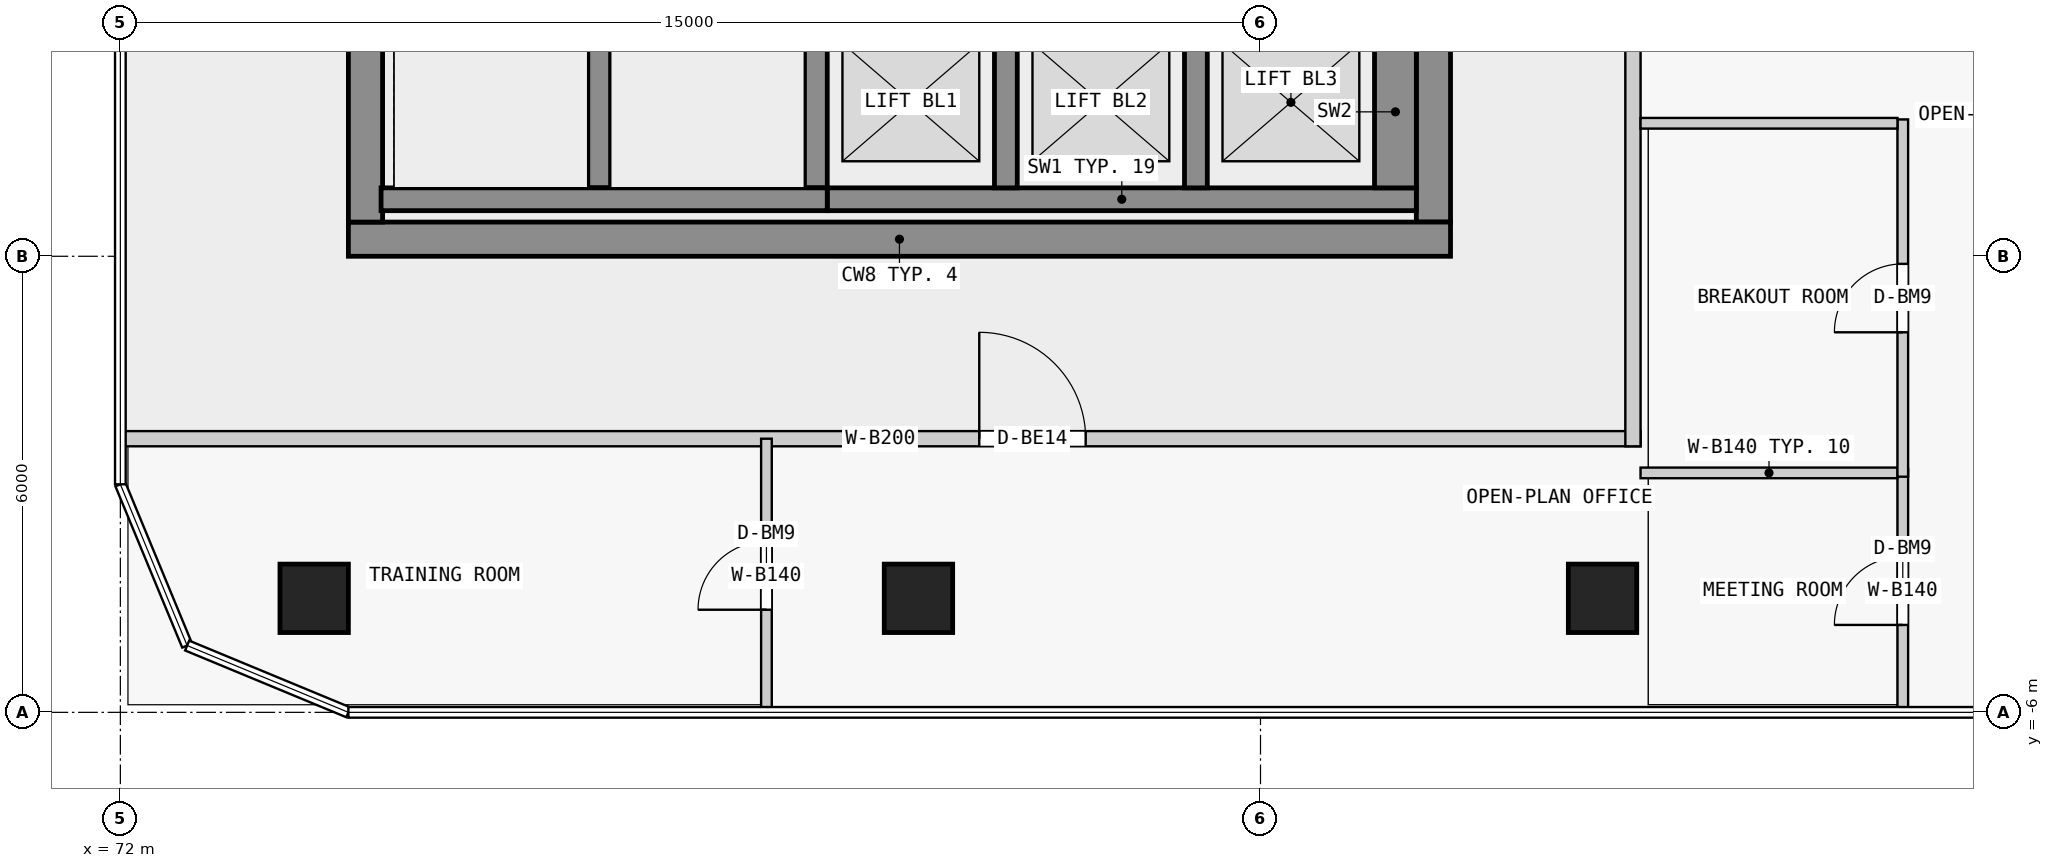
"""IFC4 building model, lengths in metres.
Left out: names, types, materials, properties, quantities, classifications, styles, units other than length and angle.
Written with IfcOpenShell. Run it as: python <this file> out.ifc"""

import sys

from ifc_helpers import new_model, si_unit, direction, frame, frame_2d, origin, origin_2d, place, context, subcontext, project, spatial, rectangle, extrude, element, fill, save


model = new_model("IFC4")
c1 = context("Model", 3, precision=1e-05, world=origin(), true_north=direction((0.0, 1.0)))
c2 = subcontext(c1, "Body", "Model", "MODEL_VIEW")
j1 = project(units=[si_unit("LENGTHUNIT", "METRE"), si_unit("PLANEANGLEUNIT", "RADIAN")], contexts=[c1])
p1 = place(None, origin())
s1 = spatial("IfcSite", under=j1, at=p1, CompositionType="ELEMENT")
p2 = place(p1, origin())
s2 = spatial("IfcBuilding", under=s1, at=p2, CompositionType="ELEMENT")
p3 = place(p2, frame((0.0, 0.0, 65.3)))
s3 = spatial("IfcBuildingStorey", under=s2, at=p3, CompositionType="ELEMENT", Elevation=65.3)
for number, where, z_axis, x_axis in (
    (1, (74.55, -4.5, 0.0), (0.0, 0.0, 1.0), (1.0, 0.0, 0.0)),
    (2, (82.5, -4.5, 0.0), (0.0, 0.0, 1.0), (1.0, 0.0, 0.0)),
    (3, (91.5, -4.5, 0.0), (0.0, 0.0, 1.0), (1.0, 0.0, 0.0)),
):
    element("IfcColumn", number, at=place(p3, frame(where, z_axis=z_axis, x_axis=x_axis)), inside=s3, PredefinedType="COLUMN", context=c2, shape_type="SweptSolid", body=[
        extrude(rectangle(XDim=0.9, YDim=0.9, at=origin_2d()), origin(), (0.0, 0.0, 1.0), 3.5),
    ])
p4 = place(p3, frame((75.0, 0.225, 0.0), z_axis=(0.0, 0.0, 1.0), x_axis=(1.0, 0.0, 0.0)))
e4 = element("IfcWall", 4, at=p4, inside=s3, PredefinedType="SHEAR", context=c2, shape_type="SweptSolid", body=[
    extrude(rectangle(XDim=14.5, YDim=0.45, at=frame_2d((7.25, 0.0))), origin(), (0.0, 0.0, 1.0), 3.25),
])
p5 = place(p3, frame((75.225, 0.45, 0.0), z_axis=(0.0, 0.0, 1.0), x_axis=(0.0, 1.0, 0.0)))
e5 = element("IfcWall", 5, at=p5, inside=s3, PredefinedType="SHEAR", context=c2, shape_type="SweptSolid", body=[
    extrude(rectangle(XDim=17.1, YDim=0.45, at=frame_2d((8.55, 0.0))), origin(), (0.0, 0.0, 1.0), 3.25),
])
p6 = place(p5, frame((7.875, 0.0, 0.0)))
e6 = element("IfcOpeningElement", 6, at=p6, cuts=e5, PredefinedType="OPENING", context=c2, shape_type="SweptSolid", body=[
    extrude(rectangle(XDim=1.8, YDim=2.1, at=frame_2d((0.9, 1.05))), frame((0.0, 0.235, 0.0), z_axis=(0.0, -1.0, 0.0), x_axis=(1.0, 0.0, 0.0)), (0.0, 0.0, 1.0), 0.47),
])
p7 = place(p3, frame((89.275, 0.45, 0.0), z_axis=(0.0, 0.0, 1.0), x_axis=(0.0, 1.0, 0.0)))
e7 = element("IfcWall", 7, at=p7, inside=s3, PredefinedType="SHEAR", context=c2, shape_type="SweptSolid", body=[
    extrude(rectangle(XDim=17.1, YDim=0.45, at=frame_2d((8.55, 0.0))), origin(), (0.0, 0.0, 1.0), 3.25),
])
p8 = place(p7, frame((7.65, 0.0, 0.0)))
e8 = element("IfcOpeningElement", 8, at=p8, cuts=e7, PredefinedType="OPENING", context=c2, shape_type="SweptSolid", body=[
    extrude(rectangle(XDim=1.8, YDim=2.1, at=frame_2d((0.9, 1.05))), frame((0.0, 0.235, 0.0), z_axis=(0.0, -1.0, 0.0), x_axis=(1.0, 0.0, 0.0)), (0.0, 0.0, 1.0), 0.47),
])
p9 = place(p3, frame((75.43, 0.75, 0.0), z_axis=(0.0, 0.0, 1.0), x_axis=(1.0, 0.0, 0.0)))
e9 = element("IfcWall", 9, at=p9, inside=s3, PredefinedType="SHEAR", context=c2, shape_type="SweptSolid", body=[
    extrude(rectangle(XDim=5.87, YDim=0.3, at=frame_2d((2.935, 0.0))), origin(), (0.0, 0.0, 1.0), 3.25),
])
for number, where, z_axis, x_axis in (
    (10, (78.3, 0.9, 0.0), (0.0, 0.0, 1.0), (0.0, 1.0, 0.0)),
    (11, (81.15, 0.9, 0.0), (0.0, 0.0, 1.0), (0.0, 1.0, 0.0)),
):
    element("IfcWall", number, at=place(p3, frame(where, z_axis=z_axis, x_axis=x_axis)), inside=s3, PredefinedType="SHEAR", context=c2, shape_type="SweptSolid", body=[
        extrude(rectangle(XDim=6.4, YDim=0.3, at=frame_2d((3.2, 0.0))), origin(), (0.0, 0.0, 1.0), 3.25),
    ])
p10 = place(p3, frame((81.3, 0.75, 0.0), z_axis=(0.0, 0.0, 1.0), x_axis=(1.0, 0.0, 0.0)))
e12 = element("IfcWall", 12, at=p10, inside=s3, PredefinedType="SHEAR", context=c2, shape_type="SweptSolid", body=[
    extrude(rectangle(XDim=7.75, YDim=0.3, at=frame_2d((3.875, 0.0))), origin(), (0.0, 0.0, 1.0), 3.25),
])
for number, where, z_axis, x_axis in (
    (13, (83.65, 0.9, 0.0), (0.0, 0.0, 1.0), (0.0, 1.0, 0.0)),
    (14, (86.15, 0.9, 0.0), (0.0, 0.0, 1.0), (0.0, 1.0, 0.0)),
):
    element("IfcWall", number, at=place(p3, frame(where, z_axis=z_axis, x_axis=x_axis)), inside=s3, PredefinedType="SHEAR", context=c2, shape_type="SweptSolid", body=[
        extrude(rectangle(XDim=2.0, YDim=0.3, at=frame_2d((1.0, 0.0))), origin(), (0.0, 0.0, 1.0), 3.25),
    ])
p11 = place(p3, frame((88.775, 0.9, 0.0), z_axis=(0.0, 0.0, 1.0), x_axis=(0.0, 1.0, 0.0)))
e15 = element("IfcWall", 15, at=p11, inside=s3, PredefinedType="SHEAR", context=c2, shape_type="SweptSolid", body=[
    extrude(rectangle(XDim=2.0, YDim=0.55, at=frame_2d((1.0, 0.0))), origin(), (0.0, 0.0, 1.0), 3.25),
])
p12 = place(p3, frame((72.0, -2.4, 0.0), z_axis=(0.0, 0.0, 1.0), x_axis=(1.0, 0.0, 0.0)))
e16 = element("IfcWall", 16, at=p12, inside=s3, PredefinedType="PARTITIONING", context=c2, shape_type="SweptSolid", body=[
    extrude(rectangle(XDim=20.0, YDim=0.2, at=frame_2d((10.0, 0.0))), origin(), (0.0, 0.0, 1.0), 3.25),
])
p13 = place(p12, frame((11.3, 0.0, 0.0)))
e17 = element("IfcOpeningElement", 17, at=p13, cuts=e16, PredefinedType="OPENING", context=c2, shape_type="SweptSolid", body=[
    extrude(rectangle(XDim=1.4, YDim=2.4, at=frame_2d((0.7, 1.2))), frame((0.0, 0.11, 0.0), z_axis=(0.0, -1.0, 0.0), x_axis=(1.0, 0.0, 0.0)), (0.0, 0.0, 1.0), 0.22),
])
p14 = place(p3, frame((91.9, -2.5, 0.0), z_axis=(0.0, 0.0, 1.0), x_axis=(0.0, 1.0, 0.0)))
e18 = element("IfcWall", 18, at=p14, inside=s3, PredefinedType="PARTITIONING", context=c2, shape_type="SweptSolid", body=[
    extrude(rectangle(XDim=12.1, YDim=0.2, at=frame_2d((6.05, 0.0))), origin(), (0.0, 0.0, 1.0), 3.25),
])
p15 = place(p3, frame((80.5, -6.0, 0.0), z_axis=(0.0, 0.0, 1.0), x_axis=(0.0, 1.0, 0.0)))
e19 = element("IfcWall", 19, at=p15, inside=s3, PredefinedType="PARTITIONING", context=c2, shape_type="SweptSolid", body=[
    extrude(rectangle(XDim=3.6, YDim=0.14, at=frame_2d((1.8, 0.0))), origin(), (0.0, 0.0, 1.0), 3.25),
])
p16 = place(p15, frame((1.35, 0.0, 0.0)))
e20 = element("IfcOpeningElement", 20, at=p16, cuts=e19, PredefinedType="OPENING", context=c2, shape_type="SweptSolid", body=[
    extrude(rectangle(XDim=0.9, YDim=2.4, at=frame_2d((0.45, 1.2))), frame((0.0, 0.08, 0.0), z_axis=(0.0, -1.0, 0.0), x_axis=(1.0, 0.0, 0.0)), (0.0, 0.0, 1.0), 0.16),
])
p17 = place(p3, frame((95.45, -6.0, 0.0), z_axis=(0.0, 0.0, 1.0), x_axis=(0.0, 1.0, 0.0)))
e21 = element("IfcWall", 21, at=p17, inside=s3, PredefinedType="PARTITIONING", context=c2, shape_type="SweptSolid", body=[
    extrude(rectangle(XDim=3.2, YDim=0.14, at=frame_2d((1.6, 0.0))), origin(), (0.0, 0.0, 1.0), 3.25),
])
p18 = place(p17, frame((1.15, 0.0, 0.0)))
e22 = element("IfcOpeningElement", 22, at=p18, cuts=e21, PredefinedType="OPENING", context=c2, shape_type="SweptSolid", body=[
    extrude(rectangle(XDim=0.9, YDim=2.4, at=frame_2d((0.45, 1.2))), frame((0.0, 0.08, 0.0), z_axis=(0.0, -1.0, 0.0), x_axis=(1.0, 0.0, 0.0)), (0.0, 0.0, 1.0), 0.16),
])
p19 = place(p3, frame((92.0, -2.85, 0.0), z_axis=(0.0, 0.0, 1.0), x_axis=(1.0, 0.0, 0.0)))
e23 = element("IfcWall", 23, at=p19, inside=s3, PredefinedType="PARTITIONING", context=c2, shape_type="SweptSolid", body=[
    extrude(rectangle(XDim=3.38, YDim=0.14, at=frame_2d((1.69, 0.0))), origin(), (0.0, 0.0, 1.0), 3.25),
])
p20 = place(p3, frame((95.45, -2.9, 0.0), z_axis=(0.0, 0.0, 1.0), x_axis=(0.0, 1.0, 0.0)))
e24 = element("IfcWall", 24, at=p20, inside=s3, PredefinedType="PARTITIONING", context=c2, shape_type="SweptSolid", body=[
    extrude(rectangle(XDim=4.7, YDim=0.14, at=frame_2d((2.35, 0.0))), origin(), (0.0, 0.0, 1.0), 3.25),
])
p21 = place(p20, frame((1.9, 0.0, 0.0)))
e25 = element("IfcOpeningElement", 25, at=p21, cuts=e24, PredefinedType="OPENING", context=c2, shape_type="SweptSolid", body=[
    extrude(rectangle(XDim=0.9, YDim=2.4, at=frame_2d((0.45, 1.2))), frame((0.0, 0.08, 0.0), z_axis=(0.0, -1.0, 0.0), x_axis=(1.0, 0.0, 0.0)), (0.0, 0.0, 1.0), 0.16),
])
p22 = place(p3, frame((92.0, 1.75, 0.0), z_axis=(0.0, 0.0, 1.0), x_axis=(1.0, 0.0, 0.0)))
e26 = element("IfcWall", 26, at=p22, inside=s3, PredefinedType="PARTITIONING", context=c2, shape_type="SweptSolid", body=[
    extrude(rectangle(XDim=3.38, YDim=0.14, at=frame_2d((1.69, 0.0))), origin(), (0.0, 0.0, 1.0), 3.25),
])
p23 = place(p13, origin())
e27 = element("IfcDoor", 27, at=p23, inside=s3, OperationType="DOUBLE_DOOR_SINGLE_SWING", PredefinedType="DOOR", context=c2, shape_type="SweptSolid", body=[
    extrude(rectangle(XDim=1.4, YDim=2.4, at=frame_2d((0.7, 1.2))), frame((0.0, 0.025, 0.0), z_axis=(0.0, -1.0, 0.0), x_axis=(1.0, 0.0, 0.0)), (0.0, 0.0, 1.0), 0.05),
])
fill(e17, e27)
p24 = place(p16, origin())
e28 = element("IfcDoor", 28, at=p24, inside=s3, OperationType="SINGLE_SWING_LEFT", PredefinedType="DOOR", context=c2, shape_type="SweptSolid", body=[
    extrude(rectangle(XDim=0.9, YDim=2.4, at=frame_2d((0.45, 1.2))), frame((0.0, 0.025, 0.0), z_axis=(0.0, -1.0, 0.0), x_axis=(1.0, 0.0, 0.0)), (0.0, 0.0, 1.0), 0.05),
])
fill(e20, e28)
p25 = place(p18, origin())
e29 = element("IfcDoor", 29, at=p25, inside=s3, OperationType="SINGLE_SWING_LEFT", PredefinedType="DOOR", context=c2, shape_type="SweptSolid", body=[
    extrude(rectangle(XDim=0.9, YDim=2.4, at=frame_2d((0.45, 1.2))), frame((0.0, 0.025, 0.0), z_axis=(0.0, -1.0, 0.0), x_axis=(1.0, 0.0, 0.0)), (0.0, 0.0, 1.0), 0.05),
])
fill(e22, e29)
p26 = place(p21, origin())
e30 = element("IfcDoor", 30, at=p26, inside=s3, OperationType="SINGLE_SWING_LEFT", PredefinedType="DOOR", context=c2, shape_type="SweptSolid", body=[
    extrude(rectangle(XDim=0.9, YDim=2.4, at=frame_2d((0.45, 1.2))), frame((0.0, 0.025, 0.0), z_axis=(0.0, -1.0, 0.0), x_axis=(1.0, 0.0, 0.0)), (0.0, 0.0, 1.0), 0.05),
])
fill(e25, e30)
save(model, sys.argv[1])
